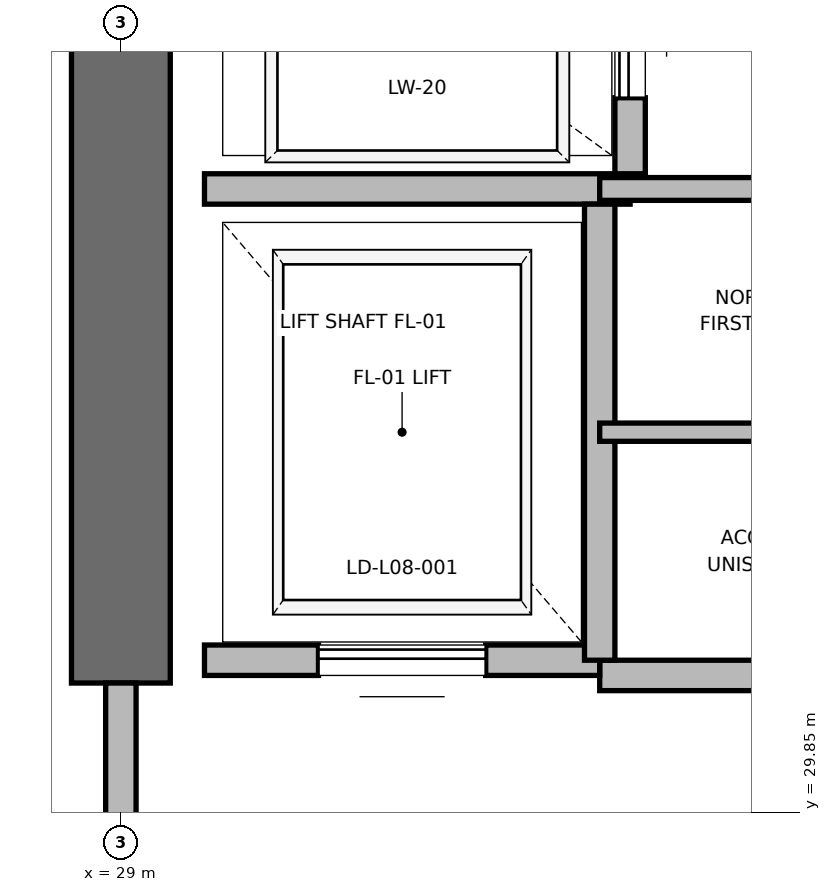
"""IFC4 building model, lengths in metres.
Left out: names, types, materials, properties, quantities, classifications, styles, units other than length and angle.
Written with IfcOpenShell. Run it as: python <this file> out.ifc"""

import sys

from ifc_helpers import new_model, si_unit, direction, frame, frame_2d, origin, place, context, subcontext, project, spatial, rectangle, extrude, element, fill, save


model = new_model("IFC4")
c1 = context("Model", 3, precision=1e-05, world=origin(), true_north=direction((0.0, 1.0)))
c2 = subcontext(c1, "Body", "Model", "MODEL_VIEW")
j1 = project(units=[si_unit("LENGTHUNIT", "METRE"), si_unit("PLANEANGLEUNIT", "RADIAN")], contexts=[c1])
p1 = place(None, origin())
s1 = spatial("IfcSite", under=j1, at=p1, CompositionType="ELEMENT")
p2 = place(p1, origin())
s2 = spatial("IfcBuilding", under=s1, at=p2, CompositionType="ELEMENT")
p3 = place(p2, frame((0.0, 0.0, 39.6)))
s3 = spatial("IfcBuildingStorey", under=s2, at=p3, CompositionType="ELEMENT", Elevation=39.6)
p4 = place(p3, frame((29.0, 30.7, 0.0), z_axis=(0.0, 0.0, 1.0), x_axis=(0.0, 1.0, 0.0)))
e1 = element("IfcWall", 1, at=p4, inside=s3, PredefinedType="SHEAR", context=c2, shape_type="SweptSolid", body=[
    extrude(rectangle(XDim=5.8, YDim=0.65, at=frame_2d((2.9, 0.0))), origin(), (0.0, 0.0, 1.0), 3.76),
])
p5 = place(p3, frame((29.0, 27.3, 0.0), z_axis=(0.0, 0.0, 1.0), x_axis=(0.0, 1.0, 0.0)))
e2 = element("IfcWall", 2, at=p5, inside=s3, PredefinedType="PARTITIONING", context=c2, shape_type="SweptSolid", body=[
    extrude(rectangle(XDim=3.4, YDim=0.2, at=frame_2d((1.7, 0.0))), origin(), (0.0, 0.0, 1.0), 2.54),
])
p6 = place(p5, frame((1.125, 0.0, 0.0)))
e3 = element("IfcOpeningElement", 3, at=p6, cuts=e2, PredefinedType="OPENING", context=c2, shape_type="SweptSolid", body=[
    extrude(rectangle(XDim=1.15, YDim=2.2, at=frame_2d((0.575, 1.1))), frame((0.0, 0.1, 0.0), z_axis=(0.0, -1.0, 0.0), x_axis=(1.0, 0.0, 0.0)), (0.0, 0.0, 1.0), 0.2),
])
p7 = place(p3, frame((32.15, 30.75, 0.0), z_axis=(0.0, 0.0, 1.0), x_axis=(1.0, 0.0, 0.0)))
e4 = element("IfcWall", 4, at=p7, inside=s3, PredefinedType="PARTITIONING", context=c2, shape_type="SweptSolid", body=[
    extrude(rectangle(XDim=3.13, YDim=0.2, at=frame_2d((1.565, 0.0))), origin(), (0.0, 0.0, 1.0), 3.76),
])
p8 = place(p3, frame((29.55, 30.85, 0.0), z_axis=(0.0, 0.0, 1.0), x_axis=(1.0, 0.0, 0.0)))
e5 = element("IfcWall", 5, at=p8, inside=s3, PredefinedType="SOLIDWALL", context=c2, shape_type="SweptSolid", body=[
    extrude(rectangle(XDim=2.6, YDim=0.2, at=frame_2d((1.3, 0.0))), origin(), (0.0, 0.0, 1.0), 2.54),
])
p9 = place(p8, frame((0.75, 0.0, 0.0)))
e6 = element("IfcOpeningElement", 6, at=p9, cuts=e5, PredefinedType="OPENING", context=c2, shape_type="SweptSolid", body=[
    extrude(rectangle(XDim=1.1, YDim=2.2, at=frame_2d((0.55, 1.1))), frame((0.0, 0.1, 0.0), z_axis=(0.0, -1.0, 0.0), x_axis=(1.0, 0.0, 0.0)), (0.0, 0.0, 1.0), 0.2),
])
p10 = place(p3, frame((29.55, 33.95, 0.0), z_axis=(0.0, 0.0, 1.0), x_axis=(1.0, 0.0, 0.0)))
e7 = element("IfcWall", 7, at=p10, inside=s3, PredefinedType="SOLIDWALL", context=c2, shape_type="SweptSolid", body=[
    extrude(rectangle(XDim=2.8, YDim=0.2, at=frame_2d((1.4, 0.0))), origin(), (0.0, 0.0, 1.0), 3.76),
])
p11 = place(p3, frame((32.15, 30.85, 0.0), z_axis=(0.0, 0.0, 1.0), x_axis=(0.0, 1.0, 0.0)))
e8 = element("IfcWall", 8, at=p11, inside=s3, PredefinedType="SOLIDWALL", context=c2, shape_type="SweptSolid", body=[
    extrude(rectangle(XDim=3.0, YDim=0.2, at=frame_2d((1.5, 0.0))), origin(), (0.0, 0.0, 1.0), 3.76),
])
p12 = place(p3, frame((32.35, 34.05, 0.0), z_axis=(0.0, 0.0, 1.0), x_axis=(0.0, 1.0, 0.0)))
e9 = element("IfcWall", 9, at=p12, inside=s3, PredefinedType="SOLIDWALL", context=c2, shape_type="SweptSolid", body=[
    extrude(rectangle(XDim=2.1, YDim=0.2, at=frame_2d((1.05, 0.0))), origin(), (0.0, 0.0, 1.0), 3.76),
])
p13 = place(p12, frame((0.5, 0.0, 0.0)))
e10 = element("IfcOpeningElement", 10, at=p13, cuts=e9, PredefinedType="OPENING", context=c2, shape_type="SweptSolid", body=[
    extrude(rectangle(XDim=1.1, YDim=2.2, at=frame_2d((0.55, 1.1))), frame((0.0, 0.1, 0.0), z_axis=(0.0, -1.0, 0.0), x_axis=(1.0, 0.0, 0.0)), (0.0, 0.0, 1.0), 0.2),
])
p14 = place(p3, frame((32.15, 33.95, 0.0), z_axis=(0.0, 0.0, 1.0), x_axis=(1.0, 0.0, 0.0)))
e11 = element("IfcWall", 11, at=p14, inside=s3, PredefinedType="PARTITIONING", context=c2, shape_type="SweptSolid", body=[
    extrude(rectangle(XDim=3.13, YDim=0.15, at=frame_2d((1.565, 0.0))), origin(), (0.0, 0.0, 1.0), 2.85),
])
p15 = place(p3, frame((32.15, 32.35, 0.0), z_axis=(0.0, 0.0, 1.0), x_axis=(1.0, 0.0, 0.0)))
e12 = element("IfcWall", 12, at=p15, inside=s3, PredefinedType="PARTITIONING", context=c2, shape_type="SweptSolid", body=[
    extrude(rectangle(XDim=3.13, YDim=0.12, at=frame_2d((1.565, 0.0))), origin(), (0.0, 0.0, 1.0), 2.85),
])
p16 = place(p9, origin())
e13 = element("IfcDoor", 13, at=p16, inside=s3, OperationType="SLIDING_TO_RIGHT", PredefinedType="DOOR", context=c2, shape_type="SweptSolid", body=[
    extrude(rectangle(XDim=1.1, YDim=2.2, at=frame_2d((0.55, 1.1))), frame((0.0, 0.025, 0.0), z_axis=(0.0, -1.0, 0.0), x_axis=(1.0, 0.0, 0.0)), (0.0, 0.0, 1.0), 0.05),
])
fill(e6, e13)
p17 = place(p13, origin())
e14 = element("IfcDoor", 14, at=p17, inside=s3, OperationType="SLIDING_TO_RIGHT", PredefinedType="DOOR", context=c2, shape_type="SweptSolid", body=[
    extrude(rectangle(XDim=1.1, YDim=2.2, at=frame_2d((0.55, 1.1))), frame((0.0, 0.025, 0.0), z_axis=(0.0, -1.0, 0.0), x_axis=(1.0, 0.0, 0.0)), (0.0, 0.0, 1.0), 0.05),
])
fill(e10, e14)
save(model, sys.argv[1])
